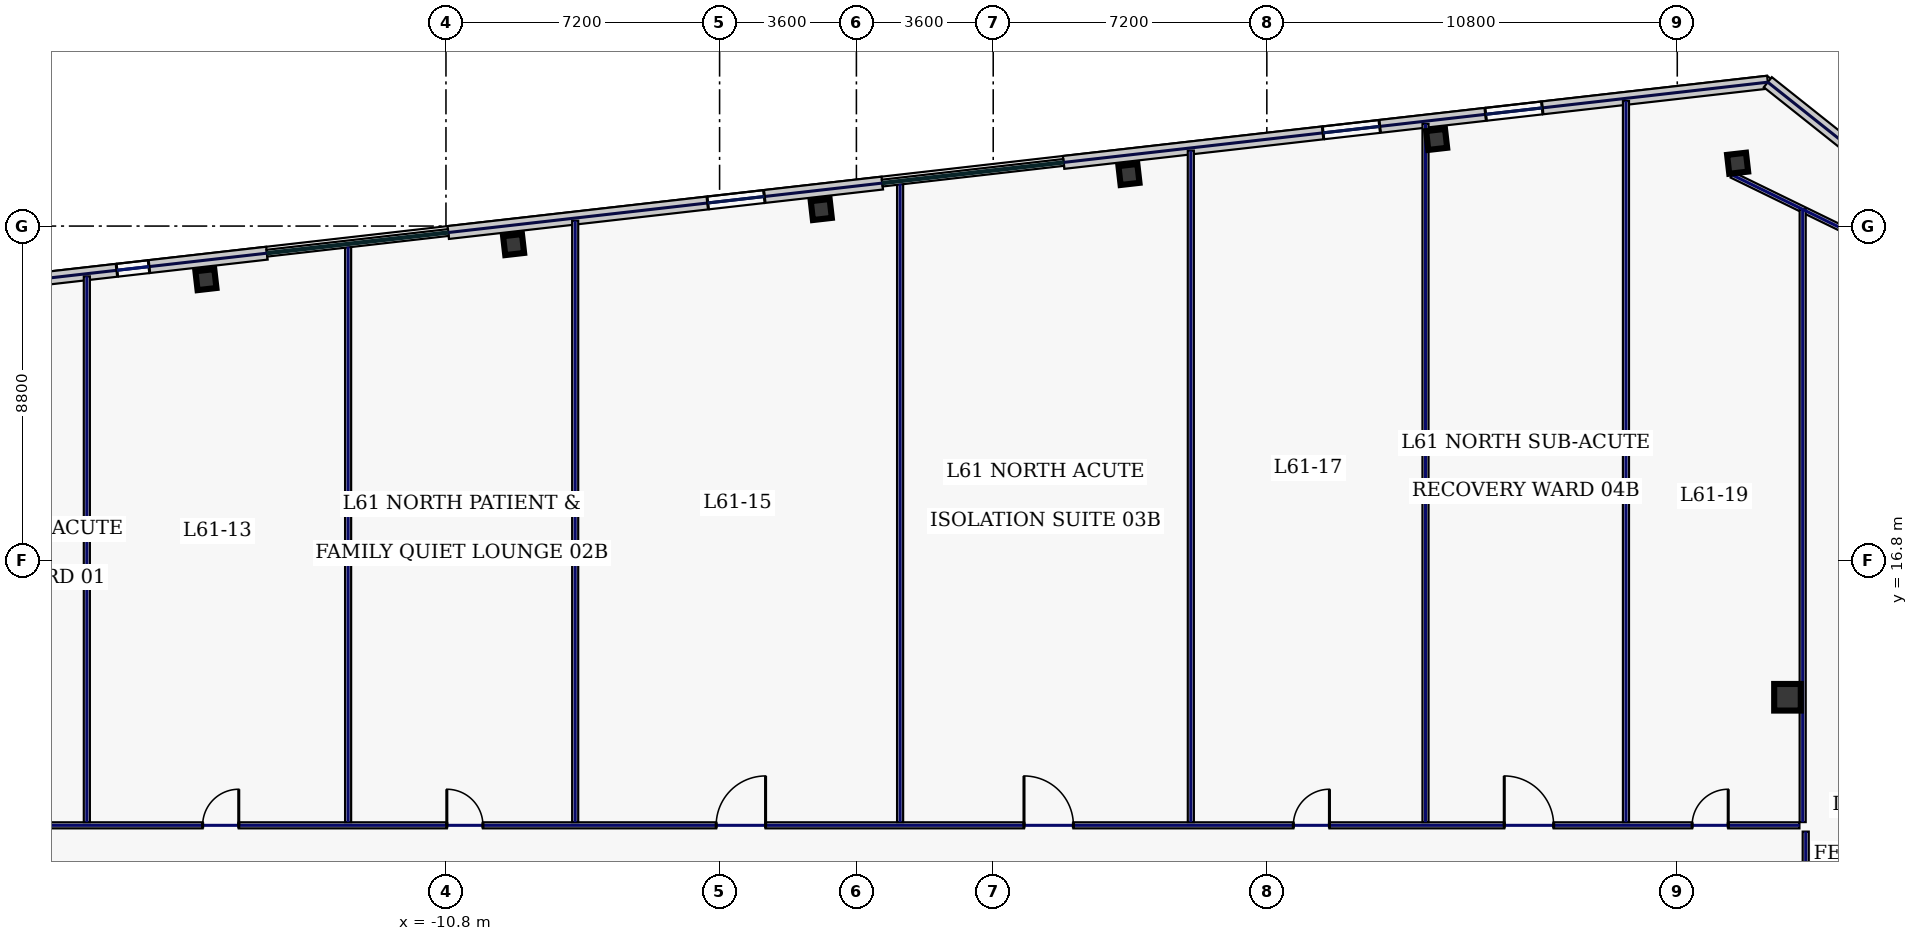
"""IFC4 building model, lengths in metres.
Left out: names, types, materials, properties, quantities, classifications, styles, units other than length and angle.
Written with IfcOpenShell. Run it as: python <this file> out.ifc"""

import sys

from ifc_helpers import new_model, si_unit, direction, frame, frame_2d, origin, origin_2d, place, context, subcontext, project, spatial, rectangle, hollow_rectangle, extrude, element, fill, save


model = new_model("IFC4")
c1 = context("Model", 3, precision=1e-05, world=origin(), true_north=direction((0.0, 1.0)))
c2 = subcontext(c1, "Body", "Model", "MODEL_VIEW")
j1 = project(units=[si_unit("LENGTHUNIT", "METRE"), si_unit("PLANEANGLEUNIT", "RADIAN")], contexts=[c1])
p1 = place(None, origin())
s1 = spatial("IfcSite", under=j1, at=p1, CompositionType="ELEMENT")
p2 = place(p1, origin())
s2 = spatial("IfcBuilding", under=s1, at=p2, CompositionType="ELEMENT")
p3 = place(p2, frame((0.0, 0.0, 263.0)))
s3 = spatial("IfcBuildingStorey", under=s2, at=p3, CompositionType="ELEMENT", Elevation=263.0)
p4 = place(p3, frame((24.5, 13.2, 0.0), z_axis=(0.0, 0.0, 1.0), x_axis=(1.0, 0.0, 0.0)))
e1 = element("IfcColumn", 1, at=p4, inside=s3, PredefinedType="COLUMN", context=c2, shape_type="SweptSolid", body=[
    extrude(hollow_rectangle(XDim=0.7, YDim=0.7, WallThickness=0.032, at=origin_2d()), origin(), (0.0, 0.0, 1.0), 3.74),
])
for number, where, z_axis, x_axis in (
    (2, (23.188, 27.253, 0.0), (0.0, 0.0, 1.0), (0.994, 0.113, 0.0)),
    (3, (15.269, 27.88, 0.0), (0.0, 0.0, 1.0), (0.994, 0.113, 0.0)),
    (4, (7.172, 26.958, 0.0), (0.0, 0.0, 1.0), (0.994, 0.113, 0.0)),
    (5, (-0.924, 26.035, 0.0), (0.0, 0.0, 1.0), (0.994, 0.113, 0.0)),
    (6, (-9.02, 25.113, 0.0), (0.0, 0.0, 1.0), (0.994, 0.113, 0.0)),
    (7, (-17.116, 24.19, 0.0), (0.0, 0.0, 1.0), (0.994, 0.113, 0.0)),
):
    element("IfcColumn", number, at=place(p3, frame(where, z_axis=z_axis, x_axis=x_axis)), inside=s3, PredefinedType="COLUMN", context=c2, shape_type="SweptSolid", body=[
        extrude(hollow_rectangle(XDim=0.5, YDim=0.5, WallThickness=0.025, at=origin_2d()), origin(), (0.0, 0.0, 1.0), 3.74),
    ])
p5 = place(p3, frame((23.983, 29.386, 0.0), z_axis=(0.0, 0.0, 1.0), x_axis=(-0.993572271362, -0.113199565282, 0.0)))
e8 = element("IfcWall", 8, at=p5, inside=s3, PredefinedType="STANDARD", context=c2, shape_type="SweptSolid", body=[
    extrude(rectangle(XDim=18.651, YDim=0.34, at=frame_2d((9.326, 0.0))), origin(), (0.0, 0.0, 1.0), 3.74),
])
p6 = place(p5, frame((10.279, 0.0, 0.83)))
e9 = element("IfcOpeningElement", 9, at=p6, cuts=e8, PredefinedType="OPENING", context=c2, shape_type="SweptSolid", body=[
    extrude(rectangle(XDim=1.5, YDim=2.0, at=frame_2d((0.75, 1.0))), frame((0.0, 0.18, 0.0), z_axis=(0.0, -1.0, 0.0), x_axis=(1.0, 0.0, 0.0)), (0.0, 0.0, 1.0), 0.36),
])
p7 = place(p5, frame((5.973, 0.0, 0.83)))
e10 = element("IfcOpeningElement", 10, at=p7, cuts=e8, PredefinedType="OPENING", context=c2, shape_type="SweptSolid", body=[
    extrude(rectangle(XDim=1.5, YDim=2.0, at=frame_2d((0.75, 1.0))), frame((0.0, 0.18, 0.0), z_axis=(0.0, -1.0, 0.0), x_axis=(1.0, 0.0, 0.0)), (0.0, 0.0, 1.0), 0.36),
])
p8 = place(p3, frame((0.682, 26.731, 0.0), z_axis=(0.0, 0.0, 1.0), x_axis=(-0.993571968199, -0.113202226169, 0.0)))
e11 = element("IfcWall", 11, at=p8, inside=s3, PredefinedType="STANDARD", context=c2, shape_type="SweptSolid", body=[
    extrude(rectangle(XDim=11.497, YDim=0.34, at=frame_2d((5.749, 0.0))), origin(), (0.0, 0.0, 1.0), 3.74),
])
p9 = place(p8, frame((3.125, 0.0, 0.83)))
e12 = element("IfcOpeningElement", 12, at=p9, cuts=e11, PredefinedType="OPENING", context=c2, shape_type="SweptSolid", body=[
    extrude(rectangle(XDim=1.5, YDim=2.0, at=frame_2d((0.75, 1.0))), frame((0.0, 0.18, 0.0), z_axis=(0.0, -1.0, 0.0), x_axis=(1.0, 0.0, 0.0)), (0.0, 0.0, 1.0), 0.36),
])
p10 = place(p3, frame((-15.51, 24.886, 0.0), z_axis=(0.0, 0.0, 1.0), x_axis=(-0.993572271362, -0.113199565282, 0.0)))
e13 = element("IfcWall", 13, at=p10, inside=s3, PredefinedType="STANDARD", context=c2, shape_type="SweptSolid", body=[
    extrude(rectangle(XDim=18.651, YDim=0.34, at=frame_2d((9.326, 0.0))), origin(), (0.0, 0.0, 1.0), 3.74),
])
p11 = place(p10, frame((15.021, 0.0, 0.83)))
e14 = element("IfcOpeningElement", 14, at=p11, cuts=e13, PredefinedType="OPENING", context=c2, shape_type="SweptSolid", body=[
    extrude(rectangle(XDim=1.5, YDim=2.0, at=frame_2d((0.75, 1.0))), frame((0.0, 0.18, 0.0), z_axis=(0.0, -1.0, 0.0), x_axis=(1.0, 0.0, 0.0)), (0.0, 0.0, 1.0), 0.36),
])
p12 = place(p10, frame((11.273, 0.0, 0.83)))
e15 = element("IfcOpeningElement", 15, at=p12, cuts=e13, PredefinedType="OPENING", context=c2, shape_type="SweptSolid", body=[
    extrude(rectangle(XDim=1.5, YDim=2.0, at=frame_2d((0.75, 1.0))), frame((0.0, 0.18, 0.0), z_axis=(0.0, -1.0, 0.0), x_axis=(1.0, 0.0, 0.0)), (0.0, 0.0, 1.0), 0.36),
])
p13 = place(p10, frame((6.873, 0.0, 0.83)))
e16 = element("IfcOpeningElement", 16, at=p13, cuts=e13, PredefinedType="OPENING", context=c2, shape_type="SweptSolid", body=[
    extrude(rectangle(XDim=1.5, YDim=2.0, at=frame_2d((0.75, 1.0))), frame((0.0, 0.18, 0.0), z_axis=(0.0, -1.0, 0.0), x_axis=(1.0, 0.0, 0.0)), (0.0, 0.0, 1.0), 0.36),
])
p14 = place(p10, frame((3.125, 0.0, 0.83)))
e17 = element("IfcOpeningElement", 17, at=p14, cuts=e13, PredefinedType="OPENING", context=c2, shape_type="SweptSolid", body=[
    extrude(rectangle(XDim=0.85, YDim=1.85, at=frame_2d((0.425, 0.925))), frame((0.0, 0.18, 0.0), z_axis=(0.0, -1.0, 0.0), x_axis=(1.0, 0.0, 0.0)), (0.0, 0.0, 1.0), 0.36),
])
p15 = place(p3, frame((29.107, 25.31, 0.0), z_axis=(0.0, 0.0, 1.0), x_axis=(-0.78259733853, 0.62252823689, 0.0)))
e18 = element("IfcWall", 18, at=p15, inside=s3, PredefinedType="STANDARD", context=c2, shape_type="SweptSolid", body=[
    extrude(rectangle(XDim=6.548, YDim=0.34, at=frame_2d((3.274, 0.0))), origin(), (0.0, 0.0, 1.0), 3.74),
])
p16 = place(p3, frame((28.528, 24.271, 0.0), z_axis=(0.0, 0.0, 1.0), x_axis=(-0.898820692789, 0.438316509173, 0.0)))
e19 = element("IfcWall", 19, at=p16, inside=s3, PredefinedType="PARTITIONING", context=c2, shape_type="SweptSolid", body=[
    extrude(rectangle(XDim=6.107, YDim=0.16, at=frame_2d((3.053, 0.0))), origin(), (0.0, 0.0, 1.0), 3.74),
])
p17 = place(p3, frame((-24.815, 9.83, 0.0), z_axis=(0.0, 0.0, 1.0), x_axis=(1.0, 0.0, 0.0)))
e20 = element("IfcWall", 20, at=p17, inside=s3, PredefinedType="PARTITIONING", context=c2, shape_type="SweptSolid", body=[
    extrude(rectangle(XDim=49.63, YDim=0.16, at=frame_2d((24.815, 0.0))), origin(), (0.0, 0.0, 1.0), 3.74),
])
p18 = place(p17, frame((1.869, 0.0, 0.0)))
e21 = element("IfcOpeningElement", 21, at=p18, cuts=e20, PredefinedType="OPENING", context=c2, shape_type="SweptSolid", body=[
    extrude(rectangle(XDim=1.3, YDim=2.2, at=frame_2d((0.65, 1.1))), frame((0.0, 0.09, 0.0), z_axis=(0.0, -1.0, 0.0), x_axis=(1.0, 0.0, 0.0)), (0.0, 0.0, 1.0), 0.18),
])
p19 = place(p17, frame((7.613, 0.0, 0.0)))
e22 = element("IfcOpeningElement", 22, at=p19, cuts=e20, PredefinedType="OPENING", context=c2, shape_type="SweptSolid", body=[
    extrude(rectangle(XDim=0.95, YDim=2.2, at=frame_2d((0.475, 1.1))), frame((0.0, 0.09, 0.0), z_axis=(0.0, -1.0, 0.0), x_axis=(1.0, 0.0, 0.0)), (0.0, 0.0, 1.0), 0.18),
])
p20 = place(p17, frame((14.038, 0.0, 0.0)))
e23 = element("IfcOpeningElement", 23, at=p20, cuts=e20, PredefinedType="OPENING", context=c2, shape_type="SweptSolid", body=[
    extrude(rectangle(XDim=0.95, YDim=2.2, at=frame_2d((0.475, 1.1))), frame((0.0, 0.09, 0.0), z_axis=(0.0, -1.0, 0.0), x_axis=(1.0, 0.0, 0.0)), (0.0, 0.0, 1.0), 0.18),
])
p21 = place(p17, frame((21.125, 0.0, 0.0)))
e24 = element("IfcOpeningElement", 24, at=p21, cuts=e20, PredefinedType="OPENING", context=c2, shape_type="SweptSolid", body=[
    extrude(rectangle(XDim=1.3, YDim=2.2, at=frame_2d((0.65, 1.1))), frame((0.0, 0.09, 0.0), z_axis=(0.0, -1.0, 0.0), x_axis=(1.0, 0.0, 0.0)), (0.0, 0.0, 1.0), 0.18),
])
p22 = place(p17, frame((29.225, 0.0, 0.0)))
e25 = element("IfcOpeningElement", 25, at=p22, cuts=e20, PredefinedType="OPENING", context=c2, shape_type="SweptSolid", body=[
    extrude(rectangle(XDim=1.3, YDim=2.2, at=frame_2d((0.65, 1.1))), frame((0.0, 0.09, 0.0), z_axis=(0.0, -1.0, 0.0), x_axis=(1.0, 0.0, 0.0)), (0.0, 0.0, 1.0), 0.18),
])
p23 = place(p17, frame((36.312, 0.0, 0.0)))
e26 = element("IfcOpeningElement", 26, at=p23, cuts=e20, PredefinedType="OPENING", context=c2, shape_type="SweptSolid", body=[
    extrude(rectangle(XDim=0.95, YDim=2.2, at=frame_2d((0.475, 1.1))), frame((0.0, 0.09, 0.0), z_axis=(0.0, -1.0, 0.0), x_axis=(1.0, 0.0, 0.0)), (0.0, 0.0, 1.0), 0.18),
])
p24 = place(p17, frame((41.863, 0.0, 0.0)))
e27 = element("IfcOpeningElement", 27, at=p24, cuts=e20, PredefinedType="OPENING", context=c2, shape_type="SweptSolid", body=[
    extrude(rectangle(XDim=1.3, YDim=2.2, at=frame_2d((0.65, 1.1))), frame((0.0, 0.09, 0.0), z_axis=(0.0, -1.0, 0.0), x_axis=(1.0, 0.0, 0.0)), (0.0, 0.0, 1.0), 0.18),
])
p25 = place(p17, frame((46.806, 0.0, 0.0)))
e28 = element("IfcOpeningElement", 28, at=p25, cuts=e20, PredefinedType="OPENING", context=c2, shape_type="SweptSolid", body=[
    extrude(rectangle(XDim=0.95, YDim=2.2, at=frame_2d((0.475, 1.1))), frame((0.0, 0.09, 0.0), z_axis=(0.0, -1.0, 0.0), x_axis=(1.0, 0.0, 0.0)), (0.0, 0.0, 1.0), 0.18),
])
p26 = place(p3, frame((24.98, 9.665, 0.0), z_axis=(0.0, 0.0, 1.0), x_axis=(0.0, -1.0, 0.0)))
e29 = element("IfcWall", 29, at=p26, inside=s3, PredefinedType="PARTITIONING", context=c2, shape_type="SweptSolid", body=[
    extrude(rectangle(XDim=19.28, YDim=0.16, at=frame_2d((9.64, 0.0))), origin(), (0.0, 0.0, 1.0), 3.74),
])
p27 = place(p26, frame((16.531, 0.0, 0.0)))
e30 = element("IfcOpeningElement", 30, at=p27, cuts=e29, PredefinedType="OPENING", context=c2, shape_type="SweptSolid", body=[
    extrude(rectangle(XDim=0.95, YDim=2.2, at=frame_2d((0.475, 1.1))), frame((0.0, 0.09, 0.0), z_axis=(0.0, -1.0, 0.0), x_axis=(1.0, 0.0, 0.0)), (0.0, 0.0, 1.0), 0.18),
])
p28 = place(p26, frame((11.25, 0.0, 0.0)))
e31 = element("IfcOpeningElement", 31, at=p28, cuts=e29, PredefinedType="OPENING", context=c2, shape_type="SweptSolid", body=[
    extrude(rectangle(XDim=0.95, YDim=2.2, at=frame_2d((0.475, 1.1))), frame((0.0, 0.09, 0.0), z_axis=(0.0, -1.0, 0.0), x_axis=(1.0, 0.0, 0.0)), (0.0, 0.0, 1.0), 0.18),
])
p29 = place(p26, frame((6.05, 0.0, 0.0)))
e32 = element("IfcOpeningElement", 32, at=p29, cuts=e29, PredefinedType="OPENING", context=c2, shape_type="SweptSolid", body=[
    extrude(rectangle(XDim=0.95, YDim=2.2, at=frame_2d((0.475, 1.1))), frame((0.0, 0.09, 0.0), z_axis=(0.0, -1.0, 0.0), x_axis=(1.0, 0.0, 0.0)), (0.0, 0.0, 1.0), 0.18),
])
p30 = place(p26, frame((1.994, 0.0, 0.0)))
e33 = element("IfcOpeningElement", 33, at=p30, cuts=e29, PredefinedType="OPENING", context=c2, shape_type="SweptSolid", body=[
    extrude(rectangle(XDim=0.95, YDim=2.2, at=frame_2d((0.475, 1.1))), frame((0.0, 0.09, 0.0), z_axis=(0.0, -1.0, 0.0), x_axis=(1.0, 0.0, 0.0)), (0.0, 0.0, 1.0), 0.18),
])
p31 = place(p3, frame((24.9, 9.915, 0.0), z_axis=(0.0, 0.0, 1.0), x_axis=(0.0, 1.0, 0.0)))
e34 = element("IfcWall", 34, at=p31, inside=s3, PredefinedType="PARTITIONING", context=c2, shape_type="SweptSolid", body=[
    extrude(rectangle(XDim=16.129, YDim=0.16, at=frame_2d((8.065, 0.0))), origin(), (0.0, 0.0, 1.0), 3.74),
])
p32 = place(p3, frame((-20.25, 9.915, 0.0), z_axis=(0.0, 0.0, 1.0), x_axis=(0.0, 1.0, 0.0)))
e35 = element("IfcWall", 35, at=p32, inside=s3, PredefinedType="PARTITIONING", context=c2, shape_type="SweptSolid", body=[
    extrude(rectangle(XDim=14.361, YDim=0.16, at=frame_2d((7.181, 0.0))), origin(), (0.0, 0.0, 1.0), 3.74),
])
p33 = place(p3, frame((-7.4, 9.915, 0.0), z_axis=(0.0, 0.0, 1.0), x_axis=(0.0, 1.0, 0.0)))
e36 = element("IfcWall", 36, at=p33, inside=s3, PredefinedType="PARTITIONING", context=c2, shape_type="SweptSolid", body=[
    extrude(rectangle(XDim=15.825, YDim=0.16, at=frame_2d((7.913, 0.0))), origin(), (0.0, 0.0, 1.0), 3.74),
])
p34 = place(p3, frame((8.8, 9.915, 0.0), z_axis=(0.0, 0.0, 1.0), x_axis=(0.0, 1.0, 0.0)))
e37 = element("IfcWall", 37, at=p34, inside=s3, PredefinedType="PARTITIONING", context=c2, shape_type="SweptSolid", body=[
    extrude(rectangle(XDim=17.671, YDim=0.16, at=frame_2d((8.835, 0.0))), origin(), (0.0, 0.0, 1.0), 3.74),
])
p35 = place(p3, frame((20.25, 9.915, 0.0), z_axis=(0.0, 0.0, 1.0), x_axis=(0.0, 1.0, 0.0)))
e38 = element("IfcWall", 38, at=p35, inside=s3, PredefinedType="PARTITIONING", context=c2, shape_type="SweptSolid", body=[
    extrude(rectangle(XDim=18.975, YDim=0.16, at=frame_2d((9.488, 0.0))), origin(), (0.0, 0.0, 1.0), 3.74),
])
p36 = place(p3, frame((-13.375, 9.915, 0.0), z_axis=(0.0, 0.0, 1.0), x_axis=(0.0, 1.0, 0.0)))
e39 = element("IfcWall", 39, at=p36, inside=s3, PredefinedType="PARTITIONING", context=c2, shape_type="SweptSolid", body=[
    extrude(rectangle(XDim=15.144, YDim=0.16, at=frame_2d((7.572, 0.0))), origin(), (0.0, 0.0, 1.0), 3.74),
])
p37 = place(p3, frame((1.15, 9.915, 0.0), z_axis=(0.0, 0.0, 1.0), x_axis=(0.0, 1.0, 0.0)))
e40 = element("IfcWall", 40, at=p37, inside=s3, PredefinedType="PARTITIONING", context=c2, shape_type="SweptSolid", body=[
    extrude(rectangle(XDim=16.799, YDim=0.16, at=frame_2d((8.4, 0.0))), origin(), (0.0, 0.0, 1.0), 3.74),
])
p38 = place(p3, frame((14.975, 9.915, 0.0), z_axis=(0.0, 0.0, 1.0), x_axis=(0.0, 1.0, 0.0)))
e41 = element("IfcWall", 41, at=p38, inside=s3, PredefinedType="PARTITIONING", context=c2, shape_type="SweptSolid", body=[
    extrude(rectangle(XDim=18.375, YDim=0.16, at=frame_2d((9.187, 0.0))), origin(), (0.0, 0.0, 1.0), 3.74),
])
p39 = place(p6, origin())
e42 = element("IfcWindow", 42, at=p39, inside=s3, PartitioningType="SINGLE_PANEL", PredefinedType="WINDOW", context=c2, shape_type="SweptSolid", body=[
    extrude(rectangle(XDim=1.5, YDim=2.0, at=frame_2d((0.75, 1.0))), frame((0.0, 0.03, 0.0), z_axis=(0.0, -1.0, 0.0), x_axis=(1.0, 0.0, 0.0)), (0.0, 0.0, 1.0), 0.06),
])
fill(e9, e42)
p40 = place(p7, origin())
e43 = element("IfcWindow", 43, at=p40, inside=s3, PartitioningType="SINGLE_PANEL", PredefinedType="WINDOW", context=c2, shape_type="SweptSolid", body=[
    extrude(rectangle(XDim=1.5, YDim=2.0, at=frame_2d((0.75, 1.0))), frame((0.0, 0.03, 0.0), z_axis=(0.0, -1.0, 0.0), x_axis=(1.0, 0.0, 0.0)), (0.0, 0.0, 1.0), 0.06),
])
fill(e10, e43)
p41 = place(p9, origin())
e44 = element("IfcWindow", 44, at=p41, inside=s3, PartitioningType="SINGLE_PANEL", PredefinedType="WINDOW", context=c2, shape_type="SweptSolid", body=[
    extrude(rectangle(XDim=1.5, YDim=2.0, at=frame_2d((0.75, 1.0))), frame((0.0, 0.03, 0.0), z_axis=(0.0, -1.0, 0.0), x_axis=(1.0, 0.0, 0.0)), (0.0, 0.0, 1.0), 0.06),
])
fill(e12, e44)
p42 = place(p14, origin())
e45 = element("IfcWindow", 45, at=p42, inside=s3, PartitioningType="SINGLE_PANEL", PredefinedType="WINDOW", context=c2, shape_type="SweptSolid", body=[
    extrude(rectangle(XDim=0.85, YDim=1.85, at=frame_2d((0.425, 0.925))), frame((0.0, 0.03, 0.0), z_axis=(0.0, -1.0, 0.0), x_axis=(1.0, 0.0, 0.0)), (0.0, 0.0, 1.0), 0.06),
])
fill(e17, e45)
p43 = place(p19, origin())
e46 = element("IfcDoor", 46, at=p43, inside=s3, OperationType="SINGLE_SWING_RIGHT", PredefinedType="DOOR", context=c2, shape_type="SweptSolid", body=[
    extrude(rectangle(XDim=0.95, YDim=2.2, at=frame_2d((0.475, 1.1))), frame((0.0, 0.025, 0.0), z_axis=(0.0, -1.0, 0.0), x_axis=(1.0, 0.0, 0.0)), (0.0, 0.0, 1.0), 0.05),
])
fill(e22, e46)
p44 = place(p20, origin())
e47 = element("IfcDoor", 47, at=p44, inside=s3, OperationType="SINGLE_SWING_LEFT", PredefinedType="DOOR", context=c2, shape_type="SweptSolid", body=[
    extrude(rectangle(XDim=0.95, YDim=2.2, at=frame_2d((0.475, 1.1))), frame((0.0, 0.025, 0.0), z_axis=(0.0, -1.0, 0.0), x_axis=(1.0, 0.0, 0.0)), (0.0, 0.0, 1.0), 0.05),
])
fill(e23, e47)
p45 = place(p21, origin())
e48 = element("IfcDoor", 48, at=p45, inside=s3, OperationType="SINGLE_SWING_RIGHT", PredefinedType="DOOR", context=c2, shape_type="SweptSolid", body=[
    extrude(rectangle(XDim=1.3, YDim=2.2, at=frame_2d((0.65, 1.1))), frame((0.0, 0.025, 0.0), z_axis=(0.0, -1.0, 0.0), x_axis=(1.0, 0.0, 0.0)), (0.0, 0.0, 1.0), 0.05),
])
fill(e24, e48)
p46 = place(p22, origin())
e49 = element("IfcDoor", 49, at=p46, inside=s3, OperationType="SINGLE_SWING_LEFT", PredefinedType="DOOR", context=c2, shape_type="SweptSolid", body=[
    extrude(rectangle(XDim=1.3, YDim=2.2, at=frame_2d((0.65, 1.1))), frame((0.0, 0.025, 0.0), z_axis=(0.0, -1.0, 0.0), x_axis=(1.0, 0.0, 0.0)), (0.0, 0.0, 1.0), 0.05),
])
fill(e25, e49)
p47 = place(p23, origin())
e50 = element("IfcDoor", 50, at=p47, inside=s3, OperationType="SINGLE_SWING_RIGHT", PredefinedType="DOOR", context=c2, shape_type="SweptSolid", body=[
    extrude(rectangle(XDim=0.95, YDim=2.2, at=frame_2d((0.475, 1.1))), frame((0.0, 0.025, 0.0), z_axis=(0.0, -1.0, 0.0), x_axis=(1.0, 0.0, 0.0)), (0.0, 0.0, 1.0), 0.05),
])
fill(e26, e50)
p48 = place(p24, origin())
e51 = element("IfcDoor", 51, at=p48, inside=s3, OperationType="SINGLE_SWING_LEFT", PredefinedType="DOOR", context=c2, shape_type="SweptSolid", body=[
    extrude(rectangle(XDim=1.3, YDim=2.2, at=frame_2d((0.65, 1.1))), frame((0.0, 0.025, 0.0), z_axis=(0.0, -1.0, 0.0), x_axis=(1.0, 0.0, 0.0)), (0.0, 0.0, 1.0), 0.05),
])
fill(e27, e51)
p49 = place(p25, origin())
e52 = element("IfcDoor", 52, at=p49, inside=s3, OperationType="SINGLE_SWING_RIGHT", PredefinedType="DOOR", context=c2, shape_type="SweptSolid", body=[
    extrude(rectangle(XDim=0.95, YDim=2.2, at=frame_2d((0.475, 1.1))), frame((0.0, 0.025, 0.0), z_axis=(0.0, -1.0, 0.0), x_axis=(1.0, 0.0, 0.0)), (0.0, 0.0, 1.0), 0.05),
])
fill(e28, e52)
save(model, sys.argv[1])
